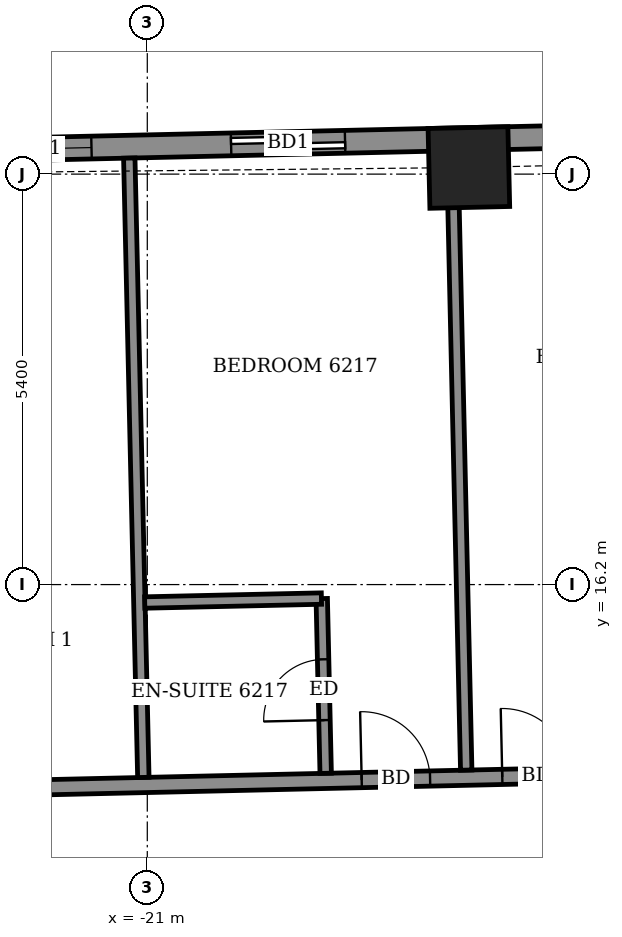
"""IFC4 building model, lengths in metres.
Left out: names, types, materials, properties, quantities, classifications, styles, units other than length and angle.
Written with IfcOpenShell. Run it as: python <this file> out.ifc"""

import sys

from ifc_helpers import new_model, si_unit, direction, frame, frame_2d, origin, origin_2d, place, context, subcontext, project, spatial, rectangle, extrude, element, fill, save


model = new_model("IFC4")
c1 = context("Model", 3, precision=1e-05, world=origin(), true_north=direction((0.0, 1.0)))
c2 = subcontext(c1, "Body", "Model", "MODEL_VIEW")
j1 = project(units=[si_unit("LENGTHUNIT", "METRE"), si_unit("PLANEANGLEUNIT", "RADIAN")], contexts=[c1])
p1 = place(None, origin())
s1 = spatial("IfcSite", under=j1, at=p1, CompositionType="ELEMENT")
p2 = place(p1, origin())
s2 = spatial("IfcBuilding", under=s1, at=p2, CompositionType="ELEMENT")
p3 = place(p2, frame((0.0, 0.0, 245.5)))
s3 = spatial("IfcBuildingStorey", under=s2, at=p3, CompositionType="ELEMENT", Elevation=245.5)
p4 = place(p3, frame((-16.769, 21.687, -0.55), z_axis=(0.0, 0.0, 1.0), x_axis=(-0.999742388325, -0.022697070002, 0.0)))
e1 = element("IfcColumn", 1, at=p4, inside=s3, PredefinedType="COLUMN", context=c2, shape_type="SweptSolid", body=[
    extrude(rectangle(XDim=1.05, YDim=1.05, at=origin_2d()), origin(), (0.0, 0.0, 1.0), 3.6),
])
p5 = place(p3, frame((20.403, 22.905, 0.0), z_axis=(0.0, 0.0, 1.0), x_axis=(-0.99974298964, -0.022670568288, 0.0)))
e2 = element("IfcWall", 2, at=p5, inside=s3, PredefinedType="SOLIDWALL", context=c2, shape_type="SweptSolid", body=[
    extrude(rectangle(XDim=44.509, YDim=0.3, at=frame_2d((22.254, 0.0))), origin(), (0.0, 0.0, 1.0), 2.5),
])
p6 = place(p5, frame((1.272, 0.0, 0.0)))
e3 = element("IfcOpeningElement", 3, at=p6, cuts=e2, PredefinedType="OPENING", context=c2, shape_type="SweptSolid", body=[
    extrude(rectangle(XDim=1.5, YDim=2.4, at=frame_2d((0.75, 1.2))), frame((0.0, 0.16, 0.0), z_axis=(0.0, -1.0, 0.0), x_axis=(1.0, 0.0, 0.0)), (0.0, 0.0, 1.0), 0.32),
])
p7 = place(p5, frame((4.501, 0.0, 0.0)))
e4 = element("IfcOpeningElement", 4, at=p7, cuts=e2, PredefinedType="OPENING", context=c2, shape_type="SweptSolid", body=[
    extrude(rectangle(XDim=1.5, YDim=2.4, at=frame_2d((0.75, 1.2))), frame((0.0, 0.16, 0.0), z_axis=(0.0, -1.0, 0.0), x_axis=(1.0, 0.0, 0.0)), (0.0, 0.0, 1.0), 0.32),
])
p8 = place(p5, frame((9.058, 0.0, 0.0)))
e5 = element("IfcOpeningElement", 5, at=p8, cuts=e2, PredefinedType="OPENING", context=c2, shape_type="SweptSolid", body=[
    extrude(rectangle(XDim=1.5, YDim=2.4, at=frame_2d((0.75, 1.2))), frame((0.0, 0.16, 0.0), z_axis=(0.0, -1.0, 0.0), x_axis=(1.0, 0.0, 0.0)), (0.0, 0.0, 1.0), 0.32),
])
p9 = place(p5, frame((12.46, 0.0, 0.0)))
e6 = element("IfcOpeningElement", 6, at=p9, cuts=e2, PredefinedType="OPENING", context=c2, shape_type="SweptSolid", body=[
    extrude(rectangle(XDim=1.5, YDim=2.4, at=frame_2d((0.75, 1.2))), frame((0.0, 0.16, 0.0), z_axis=(0.0, -1.0, 0.0), x_axis=(1.0, 0.0, 0.0)), (0.0, 0.0, 1.0), 0.32),
])
p10 = place(p5, frame((17.533, 0.0, 0.0)))
e7 = element("IfcOpeningElement", 7, at=p10, cuts=e2, PredefinedType="OPENING", context=c2, shape_type="SweptSolid", body=[
    extrude(rectangle(XDim=1.5, YDim=2.4, at=frame_2d((0.75, 1.2))), frame((0.0, 0.16, 0.0), z_axis=(0.0, -1.0, 0.0), x_axis=(1.0, 0.0, 0.0)), (0.0, 0.0, 1.0), 0.32),
])
p11 = place(p5, frame((22.993, 0.0, 0.0)))
e8 = element("IfcOpeningElement", 8, at=p11, cuts=e2, PredefinedType="OPENING", context=c2, shape_type="SweptSolid", body=[
    extrude(rectangle(XDim=1.2, YDim=2.4, at=frame_2d((0.6, 1.2))), frame((0.0, 0.16, 0.0), z_axis=(0.0, -1.0, 0.0), x_axis=(1.0, 0.0, 0.0)), (0.0, 0.0, 1.0), 0.32),
])
p12 = place(p5, frame((26.033, 0.0, 0.0)))
e9 = element("IfcOpeningElement", 9, at=p12, cuts=e2, PredefinedType="OPENING", context=c2, shape_type="SweptSolid", body=[
    extrude(rectangle(XDim=1.5, YDim=2.4, at=frame_2d((0.75, 1.2))), frame((0.0, 0.16, 0.0), z_axis=(0.0, -1.0, 0.0), x_axis=(1.0, 0.0, 0.0)), (0.0, 0.0, 1.0), 0.32),
])
p13 = place(p5, frame((30.827, 0.0, 0.0)))
e10 = element("IfcOpeningElement", 10, at=p13, cuts=e2, PredefinedType="OPENING", context=c2, shape_type="SweptSolid", body=[
    extrude(rectangle(XDim=1.5, YDim=2.4, at=frame_2d((0.75, 1.2))), frame((0.0, 0.16, 0.0), z_axis=(0.0, -1.0, 0.0), x_axis=(1.0, 0.0, 0.0)), (0.0, 0.0, 1.0), 0.32),
])
p14 = place(p5, frame((34.286, 0.0, 0.0)))
e11 = element("IfcOpeningElement", 11, at=p14, cuts=e2, PredefinedType="OPENING", context=c2, shape_type="SweptSolid", body=[
    extrude(rectangle(XDim=1.5, YDim=2.4, at=frame_2d((0.75, 1.2))), frame((0.0, 0.16, 0.0), z_axis=(0.0, -1.0, 0.0), x_axis=(1.0, 0.0, 0.0)), (0.0, 0.0, 1.0), 0.32),
])
p15 = place(p5, frame((38.811, 0.0, 0.0)))
e12 = element("IfcOpeningElement", 12, at=p15, cuts=e2, PredefinedType="OPENING", context=c2, shape_type="SweptSolid", body=[
    extrude(rectangle(XDim=1.5, YDim=2.4, at=frame_2d((0.75, 1.2))), frame((0.0, 0.16, 0.0), z_axis=(0.0, -1.0, 0.0), x_axis=(1.0, 0.0, 0.0)), (0.0, 0.0, 1.0), 0.32),
])
p16 = place(p5, frame((42.148, 0.0, 0.9)))
e13 = element("IfcOpeningElement", 13, at=p16, cuts=e2, PredefinedType="OPENING", context=c2, shape_type="SweptSolid", body=[
    extrude(rectangle(XDim=1.2, YDim=1.5, at=frame_2d((0.6, 0.75))), frame((0.0, 0.16, 0.0), z_axis=(0.0, -1.0, 0.0), x_axis=(1.0, 0.0, 0.0)), (0.0, 0.0, 1.0), 0.32),
])
p17 = place(p3, frame((-27.652, 13.413, 0.0), z_axis=(0.0, 0.0, 1.0), x_axis=(0.999742864992, 0.022676064408, 0.0)))
e14 = element("IfcWall", 14, at=p17, inside=s3, PredefinedType="PARTITIONING", context=c2, shape_type="SweptSolid", body=[
    extrude(rectangle(XDim=50.882, YDim=0.2, at=frame_2d((25.441, 0.0))), origin(), (0.0, 0.0, 1.0), 3.05),
])
p18 = place(p17, frame((47.801, 0.0, 0.0)))
e15 = element("IfcOpeningElement", 15, at=p18, cuts=e14, PredefinedType="OPENING", context=c2, shape_type="SweptSolid", body=[
    extrude(rectangle(XDim=1.0, YDim=2.1, at=frame_2d((0.5, 1.05))), frame((0.0, 0.11, 0.0), z_axis=(0.0, -1.0, 0.0), x_axis=(1.0, 0.0, 0.0)), (0.0, 0.0, 1.0), 0.22),
])
p19 = place(p17, frame((43.425, 0.0, 0.0)))
e16 = element("IfcOpeningElement", 16, at=p19, cuts=e14, PredefinedType="OPENING", context=c2, shape_type="SweptSolid", body=[
    extrude(rectangle(XDim=0.9, YDim=2.1, at=frame_2d((0.45, 1.05))), frame((0.0, 0.11, 0.0), z_axis=(0.0, -1.0, 0.0), x_axis=(1.0, 0.0, 0.0)), (0.0, 0.0, 1.0), 0.22),
])
p20 = place(p17, frame((36.8, 0.0, 0.0)))
e17 = element("IfcOpeningElement", 17, at=p20, cuts=e14, PredefinedType="OPENING", context=c2, shape_type="SweptSolid", body=[
    extrude(rectangle(XDim=0.9, YDim=2.1, at=frame_2d((0.45, 1.05))), frame((0.0, 0.11, 0.0), z_axis=(0.0, -1.0, 0.0), x_axis=(1.0, 0.0, 0.0)), (0.0, 0.0, 1.0), 0.22),
])
p21 = place(p17, frame((34.975, 0.0, 0.0)))
e18 = element("IfcOpeningElement", 18, at=p21, cuts=e14, PredefinedType="OPENING", context=c2, shape_type="SweptSolid", body=[
    extrude(rectangle(XDim=0.9, YDim=2.1, at=frame_2d((0.45, 1.05))), frame((0.0, 0.11, 0.0), z_axis=(0.0, -1.0, 0.0), x_axis=(1.0, 0.0, 0.0)), (0.0, 0.0, 1.0), 0.22),
])
p22 = place(p17, frame((28.325, 0.0, 0.0)))
e19 = element("IfcOpeningElement", 19, at=p22, cuts=e14, PredefinedType="OPENING", context=c2, shape_type="SweptSolid", body=[
    extrude(rectangle(XDim=0.9, YDim=2.1, at=frame_2d((0.45, 1.05))), frame((0.0, 0.11, 0.0), z_axis=(0.0, -1.0, 0.0), x_axis=(1.0, 0.0, 0.0)), (0.0, 0.0, 1.0), 0.22),
])
p23 = place(p17, frame((26.475, 0.0, 0.0)))
e20 = element("IfcOpeningElement", 20, at=p23, cuts=e14, PredefinedType="OPENING", context=c2, shape_type="SweptSolid", body=[
    extrude(rectangle(XDim=0.9, YDim=2.1, at=frame_2d((0.45, 1.05))), frame((0.0, 0.11, 0.0), z_axis=(0.0, -1.0, 0.0), x_axis=(1.0, 0.0, 0.0)), (0.0, 0.0, 1.0), 0.22),
])
p24 = place(p17, frame((19.825, 0.0, 0.0)))
e21 = element("IfcOpeningElement", 21, at=p24, cuts=e14, PredefinedType="OPENING", context=c2, shape_type="SweptSolid", body=[
    extrude(rectangle(XDim=0.9, YDim=2.1, at=frame_2d((0.45, 1.05))), frame((0.0, 0.11, 0.0), z_axis=(0.0, -1.0, 0.0), x_axis=(1.0, 0.0, 0.0)), (0.0, 0.0, 1.0), 0.22),
])
p25 = place(p17, frame((17.975, 0.0, 0.0)))
e22 = element("IfcOpeningElement", 22, at=p25, cuts=e14, PredefinedType="OPENING", context=c2, shape_type="SweptSolid", body=[
    extrude(rectangle(XDim=0.9, YDim=2.1, at=frame_2d((0.45, 1.05))), frame((0.0, 0.11, 0.0), z_axis=(0.0, -1.0, 0.0), x_axis=(1.0, 0.0, 0.0)), (0.0, 0.0, 1.0), 0.22),
])
p26 = place(p17, frame((11.325, 0.0, 0.0)))
e23 = element("IfcOpeningElement", 23, at=p26, cuts=e14, PredefinedType="OPENING", context=c2, shape_type="SweptSolid", body=[
    extrude(rectangle(XDim=0.9, YDim=2.1, at=frame_2d((0.45, 1.05))), frame((0.0, 0.11, 0.0), z_axis=(0.0, -1.0, 0.0), x_axis=(1.0, 0.0, 0.0)), (0.0, 0.0, 1.0), 0.22),
])
p27 = place(p17, frame((9.475, 0.0, 0.0)))
e24 = element("IfcOpeningElement", 24, at=p27, cuts=e14, PredefinedType="OPENING", context=c2, shape_type="SweptSolid", body=[
    extrude(rectangle(XDim=0.9, YDim=2.1, at=frame_2d((0.45, 1.05))), frame((0.0, 0.11, 0.0), z_axis=(0.0, -1.0, 0.0), x_axis=(1.0, 0.0, 0.0)), (0.0, 0.0, 1.0), 0.22),
])
p28 = place(p17, frame((2.772, 0.0, 0.0)))
e25 = element("IfcOpeningElement", 25, at=p28, cuts=e14, PredefinedType="OPENING", context=c2, shape_type="SweptSolid", body=[
    extrude(rectangle(XDim=1.0, YDim=2.1, at=frame_2d((0.5, 1.05))), frame((0.0, 0.11, 0.0), z_axis=(0.0, -1.0, 0.0), x_axis=(1.0, 0.0, 0.0)), (0.0, 0.0, 1.0), 0.22),
])
p29 = place(p3, frame((-21.052, 13.663, 0.0), z_axis=(0.0, 0.0, 1.0), x_axis=(-0.022706435224, 0.999742175663, 0.0)))
e26 = element("IfcWall", 26, at=p29, inside=s3, PredefinedType="PARTITIONING", context=c2, shape_type="SweptSolid", body=[
    extrude(rectangle(XDim=8.15, YDim=0.15, at=frame_2d((4.075, 0.0))), origin(), (0.0, 0.0, 1.0), 2.5),
])
p30 = place(p3, frame((-18.653, 13.717, 0.0), z_axis=(0.0, 0.0, 1.0), x_axis=(-0.022612884682, 0.999744296031, 0.0)))
e27 = element("IfcWall", 27, at=p30, inside=s3, PredefinedType="PARTITIONING", context=c2, shape_type="SweptSolid", body=[
    extrude(rectangle(XDim=2.3, YDim=0.15, at=frame_2d((1.15, 0.0))), origin(), (0.0, 0.0, 1.0), 3.05),
])
p31 = place(p30, frame((0.7, 0.0, 0.0)))
e28 = element("IfcOpeningElement", 28, at=p31, cuts=e27, PredefinedType="OPENING", context=c2, shape_type="SweptSolid", body=[
    extrude(rectangle(XDim=0.8, YDim=2.1, at=frame_2d((0.4, 1.05))), frame((0.0, 0.085, 0.0), z_axis=(0.0, -1.0, 0.0), x_axis=(1.0, 0.0, 0.0)), (0.0, 0.0, 1.0), 0.17),
])
p32 = place(p3, frame((-16.804, 13.759, 0.0), z_axis=(0.0, 0.0, 1.0), x_axis=(-0.022586673637, 0.999744888546, 0.0)))
e29 = element("IfcWall", 29, at=p32, inside=s3, PredefinedType="PARTITIONING", context=c2, shape_type="SweptSolid", body=[
    extrude(rectangle(XDim=8.15, YDim=0.15, at=frame_2d((4.075, 0.0))), origin(), (0.0, 0.0, 1.0), 3.05),
])
p33 = place(p3, frame((-21.034, 15.964, 0.0), z_axis=(0.0, 0.0, 1.0), x_axis=(0.999749954681, 0.022361308448, 0.0)))
e30 = element("IfcWall", 30, at=p33, inside=s3, PredefinedType="PARTITIONING", context=c2, shape_type="SweptSolid", body=[
    extrude(rectangle(XDim=2.325, YDim=0.15, at=frame_2d((1.163, 0.0))), origin(), (0.0, 0.0, 1.0), 3.05),
])
p34 = place(p15, origin())
e31 = element("IfcDoor", 31, at=p34, inside=s3, OperationType="SLIDING_TO_LEFT", PredefinedType="DOOR", context=c2, shape_type="SweptSolid", body=[
    extrude(rectangle(XDim=1.5, YDim=2.4, at=frame_2d((0.75, 1.2))), frame((0.0, 0.025, 0.0), z_axis=(0.0, -1.0, 0.0), x_axis=(1.0, 0.0, 0.0)), (0.0, 0.0, 1.0), 0.05),
])
fill(e12, e31)
p35 = place(p16, origin())
e32 = element("IfcWindow", 32, at=p35, inside=s3, PartitioningType="SINGLE_PANEL", PredefinedType="WINDOW", context=c2, shape_type="SweptSolid", body=[
    extrude(rectangle(XDim=1.2, YDim=1.5, at=frame_2d((0.6, 0.75))), frame((0.0, 0.03, 0.0), z_axis=(0.0, -1.0, 0.0), x_axis=(1.0, 0.0, 0.0)), (0.0, 0.0, 1.0), 0.06),
])
fill(e13, e32)
p36 = place(p26, origin())
e33 = element("IfcDoor", 33, at=p36, inside=s3, OperationType="SINGLE_SWING_RIGHT", PredefinedType="DOOR", context=c2, shape_type="SweptSolid", body=[
    extrude(rectangle(XDim=0.9, YDim=2.1, at=frame_2d((0.45, 1.05))), frame((0.0, 0.025, 0.0), z_axis=(0.0, -1.0, 0.0), x_axis=(1.0, 0.0, 0.0)), (0.0, 0.0, 1.0), 0.05),
])
fill(e23, e33)
p37 = place(p27, origin())
e34 = element("IfcDoor", 34, at=p37, inside=s3, OperationType="SINGLE_SWING_LEFT", PredefinedType="DOOR", context=c2, shape_type="SweptSolid", body=[
    extrude(rectangle(XDim=0.9, YDim=2.1, at=frame_2d((0.45, 1.05))), frame((0.0, 0.025, 0.0), z_axis=(0.0, -1.0, 0.0), x_axis=(1.0, 0.0, 0.0)), (0.0, 0.0, 1.0), 0.05),
])
fill(e24, e34)
p38 = place(p31, origin())
e35 = element("IfcDoor", 35, at=p38, inside=s3, OperationType="SINGLE_SWING_LEFT", PredefinedType="DOOR", context=c2, shape_type="SweptSolid", body=[
    extrude(rectangle(XDim=0.8, YDim=2.1, at=frame_2d((0.4, 1.05))), frame((0.0, 0.025, 0.0), z_axis=(0.0, -1.0, 0.0), x_axis=(1.0, 0.0, 0.0)), (0.0, 0.0, 1.0), 0.05),
])
fill(e28, e35)
save(model, sys.argv[1])
